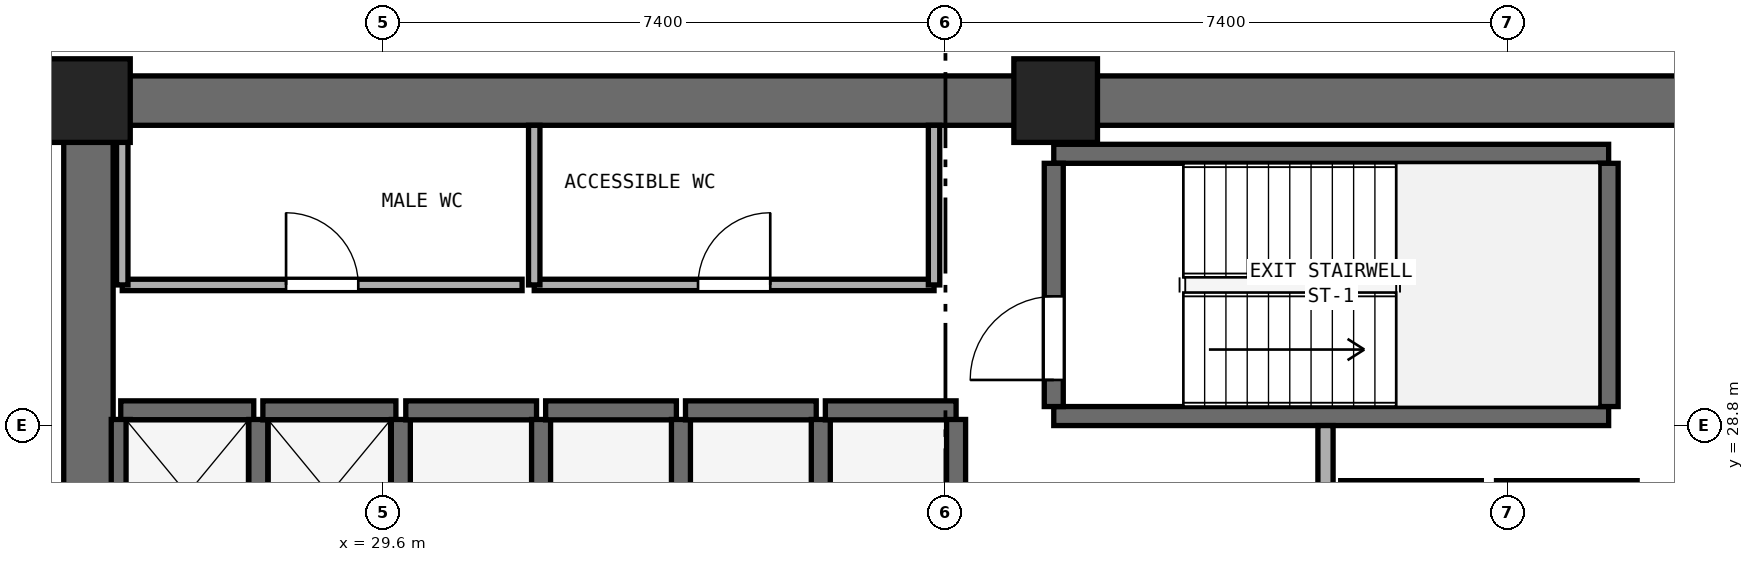
"""IFC4 building model, lengths in metres.
Left out: names, types, materials, properties, quantities, classifications, styles, units other than length and angle.
Written with IfcOpenShell. Run it as: python <this file> out.ifc"""

import sys

from ifc_helpers import new_model, si_unit, direction, frame, frame_2d, origin, origin_2d, place, context, subcontext, project, spatial, rectangle, extrude, element, fill, save


model = new_model("IFC4")
c1 = context("Model", 3, precision=1e-05, world=origin(), true_north=direction((0.0, 1.0)))
c2 = subcontext(c1, "Body", "Model", "MODEL_VIEW")
j1 = project(units=[si_unit("LENGTHUNIT", "METRE"), si_unit("PLANEANGLEUNIT", "RADIAN")], contexts=[c1])
p1 = place(None, origin())
s1 = spatial("IfcSite", under=j1, at=p1, CompositionType="ELEMENT")
p2 = place(p1, origin())
s2 = spatial("IfcBuilding", under=s1, at=p2, CompositionType="ELEMENT")
p3 = place(p2, frame((0.0, 0.0, 44.0)))
s3 = spatial("IfcBuildingStorey", under=s2, at=p3, CompositionType="ELEMENT", Elevation=44.0)
p4 = place(p3, frame((25.4, 33.075, 0.0), z_axis=(0.0, 0.0, 1.0), x_axis=(1.0, 0.0, 0.0)))
e1 = element("IfcWall", 1, at=p4, inside=s3, PredefinedType="SHEAR", context=c2, shape_type="SweptSolid", body=[
    extrude(rectangle(XDim=23.2, YDim=0.65, at=frame_2d((11.6, 0.0))), origin(), (0.0, 0.0, 1.0), 3.525),
])
p5 = place(p3, frame((25.725, 17.65, 0.0), z_axis=(0.0, 0.0, 1.0), x_axis=(0.0, 1.0, 0.0)))
e2 = element("IfcWall", 2, at=p5, inside=s3, PredefinedType="SHEAR", context=c2, shape_type="SweptSolid", body=[
    extrude(rectangle(XDim=15.1, YDim=0.65, at=frame_2d((7.55, 0.0))), origin(), (0.0, 0.0, 1.0), 3.525),
])
p6 = place(p5, frame((6.8, 0.0, 0.0)))
e3 = element("IfcOpeningElement", 3, at=p6, cuts=e2, PredefinedType="OPENING", context=c2, shape_type="SweptSolid", body=[
    extrude(rectangle(XDim=1.5, YDim=2.15, at=frame_2d((0.75, 1.075))), frame((0.0, 0.335, 0.0), z_axis=(0.0, -1.0, 0.0), x_axis=(1.0, 0.0, 0.0)), (0.0, 0.0, 1.0), 0.67),
])
for number, where, z_axis, x_axis in (
    (4, (38.45, 33.075, 0.0), (0.0, 0.0, 1.0), (1.0, 0.0, 0.0)),
    (5, (25.725, 33.075, 0.0), (0.0, 0.0, 1.0), (1.0, 0.0, 0.0)),
):
    element("IfcColumn", number, at=place(p3, frame(where, z_axis=z_axis, x_axis=x_axis)), inside=s3, PredefinedType="PILASTER", context=c2, shape_type="SweptSolid", body=[
        extrude(rectangle(XDim=1.1, YDim=1.1, at=origin_2d()), origin(), (0.0, 0.0, 1.0), 3.8),
    ])
for number, where, z_axis, x_axis in (
    (6, (38.425, 28.925, 0.0), (0.0, 0.0, 1.0), (1.0, 0.0, 0.0)),
    (7, (38.425, 32.375, 0.0), (0.0, 0.0, 1.0), (1.0, 0.0, 0.0)),
):
    element("IfcWall", number, at=place(p3, frame(where, z_axis=z_axis, x_axis=x_axis)), inside=s3, PredefinedType="SHEAR", context=c2, shape_type="SweptSolid", body=[
        extrude(rectangle(XDim=7.3, YDim=0.25, at=frame_2d((3.65, 0.0))), origin(), (0.0, 0.0, 1.0), 3.525),
    ])
p7 = place(p3, frame((38.425, 29.05, 0.0), z_axis=(0.0, 0.0, 1.0), x_axis=(0.0, 1.0, 0.0)))
e8 = element("IfcWall", 8, at=p7, inside=s3, PredefinedType="SHEAR", context=c2, shape_type="SweptSolid", body=[
    extrude(rectangle(XDim=3.2, YDim=0.25, at=frame_2d((1.6, 0.0))), origin(), (0.0, 0.0, 1.0), 3.525),
])
p8 = place(p7, frame((0.35, 0.0, 0.0)))
e9 = element("IfcOpeningElement", 9, at=p8, cuts=e8, PredefinedType="OPENING", context=c2, shape_type="SweptSolid", body=[
    extrude(rectangle(XDim=1.1, YDim=2.15, at=frame_2d((0.55, 1.075))), frame((0.0, 0.135, 0.0), z_axis=(0.0, -1.0, 0.0), x_axis=(1.0, 0.0, 0.0)), (0.0, 0.0, 1.0), 0.27),
])
p9 = place(p3, frame((45.725, 29.05, 0.0), z_axis=(0.0, 0.0, 1.0), x_axis=(0.0, 1.0, 0.0)))
e10 = element("IfcWall", 10, at=p9, inside=s3, PredefinedType="SHEAR", context=c2, shape_type="SweptSolid", body=[
    extrude(rectangle(XDim=3.2, YDim=0.25, at=frame_2d((1.6, 0.0))), origin(), (0.0, 0.0, 1.0), 3.525),
])
p10 = place(p3, frame((26.15, 29.0, 0.0), z_axis=(0.0, 0.0, 1.0), x_axis=(1.0, 0.0, 0.0)))
e11 = element("IfcWall", 11, at=p10, inside=s3, PredefinedType="SHEAR", context=c2, shape_type="SweptSolid", body=[
    extrude(rectangle(XDim=1.75, YDim=0.25, at=frame_2d((0.875, 0.0))), origin(), (0.0, 0.0, 1.0), 3.525),
])
for number, where, z_axis, x_axis in (
    (12, (26.15, 26.92, 0.0), (0.0, 0.0, 1.0), (0.0, 1.0, 0.0)),
    (13, (27.96, 26.92, 0.0), (0.0, 0.0, 1.0), (0.0, 1.0, 0.0)),
):
    element("IfcWall", number, at=place(p3, frame(where, z_axis=z_axis, x_axis=x_axis)), inside=s3, PredefinedType="SHEAR", context=c2, shape_type="SweptSolid", body=[
        extrude(rectangle(XDim=1.96, YDim=0.25, at=frame_2d((0.98, 0.0))), origin(), (0.0, 0.0, 1.0), 3.525),
    ])
p11 = place(p3, frame((28.02, 29.0, 0.0), z_axis=(0.0, 0.0, 1.0), x_axis=(1.0, 0.0, 0.0)))
e14 = element("IfcWall", 14, at=p11, inside=s3, PredefinedType="SHEAR", context=c2, shape_type="SweptSolid", body=[
    extrude(rectangle(XDim=1.75, YDim=0.25, at=frame_2d((0.875, 0.0))), origin(), (0.0, 0.0, 1.0), 3.525),
])
p12 = place(p3, frame((29.835, 26.92, 0.0), z_axis=(0.0, 0.0, 1.0), x_axis=(0.0, 1.0, 0.0)))
e15 = element("IfcWall", 15, at=p12, inside=s3, PredefinedType="SHEAR", context=c2, shape_type="SweptSolid", body=[
    extrude(rectangle(XDim=1.96, YDim=0.25, at=frame_2d((0.98, 0.0))), origin(), (0.0, 0.0, 1.0), 3.525),
])
p13 = place(p3, frame((29.9, 29.0, 0.0), z_axis=(0.0, 0.0, 1.0), x_axis=(1.0, 0.0, 0.0)))
e16 = element("IfcWall", 16, at=p13, inside=s3, PredefinedType="SHEAR", context=c2, shape_type="SweptSolid", body=[
    extrude(rectangle(XDim=1.72, YDim=0.25, at=frame_2d((0.86, 0.0))), origin(), (0.0, 0.0, 1.0), 3.525),
])
p14 = place(p3, frame((31.68, 26.92, 0.0), z_axis=(0.0, 0.0, 1.0), x_axis=(0.0, 1.0, 0.0)))
e17 = element("IfcWall", 17, at=p14, inside=s3, PredefinedType="SHEAR", context=c2, shape_type="SweptSolid", body=[
    extrude(rectangle(XDim=1.96, YDim=0.25, at=frame_2d((0.98, 0.0))), origin(), (0.0, 0.0, 1.0), 3.525),
])
p15 = place(p3, frame((31.74, 29.0, 0.0), z_axis=(0.0, 0.0, 1.0), x_axis=(1.0, 0.0, 0.0)))
e18 = element("IfcWall", 18, at=p15, inside=s3, PredefinedType="SHEAR", context=c2, shape_type="SweptSolid", body=[
    extrude(rectangle(XDim=1.72, YDim=0.25, at=frame_2d((0.86, 0.0))), origin(), (0.0, 0.0, 1.0), 3.525),
])
p16 = place(p3, frame((33.52, 26.92, 0.0), z_axis=(0.0, 0.0, 1.0), x_axis=(0.0, 1.0, 0.0)))
e19 = element("IfcWall", 19, at=p16, inside=s3, PredefinedType="SHEAR", context=c2, shape_type="SweptSolid", body=[
    extrude(rectangle(XDim=1.96, YDim=0.25, at=frame_2d((0.98, 0.0))), origin(), (0.0, 0.0, 1.0), 3.525),
])
p17 = place(p3, frame((33.58, 29.0, 0.0), z_axis=(0.0, 0.0, 1.0), x_axis=(1.0, 0.0, 0.0)))
e20 = element("IfcWall", 20, at=p17, inside=s3, PredefinedType="SHEAR", context=c2, shape_type="SweptSolid", body=[
    extrude(rectangle(XDim=1.72, YDim=0.25, at=frame_2d((0.86, 0.0))), origin(), (0.0, 0.0, 1.0), 3.525),
])
p18 = place(p3, frame((35.36, 26.92, 0.0), z_axis=(0.0, 0.0, 1.0), x_axis=(0.0, 1.0, 0.0)))
e21 = element("IfcWall", 21, at=p18, inside=s3, PredefinedType="SHEAR", context=c2, shape_type="SweptSolid", body=[
    extrude(rectangle(XDim=1.96, YDim=0.25, at=frame_2d((0.98, 0.0))), origin(), (0.0, 0.0, 1.0), 3.525),
])
p19 = place(p3, frame((35.42, 29.0, 0.0), z_axis=(0.0, 0.0, 1.0), x_axis=(1.0, 0.0, 0.0)))
e22 = element("IfcWall", 22, at=p19, inside=s3, PredefinedType="SHEAR", context=c2, shape_type="SweptSolid", body=[
    extrude(rectangle(XDim=1.72, YDim=0.25, at=frame_2d((0.86, 0.0))), origin(), (0.0, 0.0, 1.0), 3.525),
])
p20 = place(p3, frame((37.14, 26.92, 0.0), z_axis=(0.0, 0.0, 1.0), x_axis=(0.0, 1.0, 0.0)))
e23 = element("IfcWall", 23, at=p20, inside=s3, PredefinedType="SHEAR", context=c2, shape_type="SweptSolid", body=[
    extrude(rectangle(XDim=1.96, YDim=0.25, at=frame_2d((0.98, 0.0))), origin(), (0.0, 0.0, 1.0), 3.525),
])
for number, where, z_axis, x_axis in (
    (24, (42.2, 27.95, 0.0), (0.0, 0.0, 1.0), (1.0, 0.0, 0.0)),
    (25, (44.25, 27.95, 0.0), (0.0, 0.0, 1.0), (1.0, 0.0, 0.0)),
):
    element("IfcWall", number, at=place(p3, frame(where, z_axis=z_axis, x_axis=x_axis)), inside=s3, PredefinedType="SHEAR", context=c2, shape_type="SweptSolid", body=[
        extrude(rectangle(XDim=1.85, YDim=0.25, at=frame_2d((0.925, 0.0))), origin(), (0.0, 0.0, 1.0), 3.525),
    ])
p21 = place(p3, frame((42.0, 22.75, 0.0), z_axis=(0.0, 0.0, 1.0), x_axis=(0.0, 1.0, 0.0)))
e26 = element("IfcWall", 26, at=p21, inside=s3, PredefinedType="SOLIDWALL", context=c2, shape_type="SweptSolid", body=[
    extrude(rectangle(XDim=6.05, YDim=0.2, at=frame_2d((3.025, 0.0))), origin(), (0.0, 0.0, 1.0), 3.525),
])
p22 = place(p21, frame((0.65, 0.0, 0.0)))
e27 = element("IfcOpeningElement", 27, at=p22, cuts=e26, PredefinedType="OPENING", context=c2, shape_type="SweptSolid", body=[
    extrude(rectangle(XDim=1.2, YDim=2.15, at=frame_2d((0.6, 1.075))), frame((0.0, 0.11, 0.0), z_axis=(0.0, -1.0, 0.0), x_axis=(1.0, 0.0, 0.0)), (0.0, 0.0, 1.0), 0.22),
])
p23 = place(p3, frame((26.17, 30.65, 0.0), z_axis=(0.0, 0.0, 1.0), x_axis=(1.0, 0.0, 0.0)))
e28 = element("IfcWall", 28, at=p23, inside=s3, PredefinedType="PARTITIONING", context=c2, shape_type="SweptSolid", body=[
    extrude(rectangle(XDim=5.26, YDim=0.15, at=frame_2d((2.63, 0.0))), origin(), (0.0, 0.0, 1.0), 3.525),
])
p24 = place(p23, frame((2.155, 0.0, 0.0)))
e29 = element("IfcOpeningElement", 29, at=p24, cuts=e28, PredefinedType="OPENING", context=c2, shape_type="SweptSolid", body=[
    extrude(rectangle(XDim=0.95, YDim=2.1, at=frame_2d((0.475, 1.05))), frame((0.0, 0.085, 0.0), z_axis=(0.0, -1.0, 0.0), x_axis=(1.0, 0.0, 0.0)), (0.0, 0.0, 1.0), 0.17),
])
p25 = place(p3, frame((26.17, 30.65, 0.0), z_axis=(0.0, 0.0, 1.0), x_axis=(0.0, 1.0, 0.0)))
e30 = element("IfcWall", 30, at=p25, inside=s3, PredefinedType="PARTITIONING", context=c2, shape_type="SweptSolid", body=[
    extrude(rectangle(XDim=2.1, YDim=0.15, at=frame_2d((1.05, 0.0))), origin(), (0.0, 0.0, 1.0), 3.525),
])
p26 = place(p3, frame((31.59, 30.65, 0.0), z_axis=(0.0, 0.0, 1.0), x_axis=(1.0, 0.0, 0.0)))
e31 = element("IfcWall", 31, at=p26, inside=s3, PredefinedType="PARTITIONING", context=c2, shape_type="SweptSolid", body=[
    extrude(rectangle(XDim=5.26, YDim=0.15, at=frame_2d((2.63, 0.0))), origin(), (0.0, 0.0, 1.0), 3.525),
])
p27 = place(p26, frame((2.155, 0.0, 0.0)))
e32 = element("IfcOpeningElement", 32, at=p27, cuts=e31, PredefinedType="OPENING", context=c2, shape_type="SweptSolid", body=[
    extrude(rectangle(XDim=0.95, YDim=2.1, at=frame_2d((0.475, 1.05))), frame((0.0, 0.085, 0.0), z_axis=(0.0, -1.0, 0.0), x_axis=(1.0, 0.0, 0.0)), (0.0, 0.0, 1.0), 0.17),
])
for number, where, z_axis, x_axis in (
    (33, (31.59, 30.65, 0.0), (0.0, 0.0, 1.0), (0.0, 1.0, 0.0)),
    (34, (36.85, 30.65, 0.0), (0.0, 0.0, 1.0), (0.0, 1.0, 0.0)),
):
    element("IfcWall", number, at=place(p3, frame(where, z_axis=z_axis, x_axis=x_axis)), inside=s3, PredefinedType="PARTITIONING", context=c2, shape_type="SweptSolid", body=[
        extrude(rectangle(XDim=2.1, YDim=0.15, at=frame_2d((1.05, 0.0))), origin(), (0.0, 0.0, 1.0), 3.525),
    ])
p28 = place(p8, origin())
e35 = element("IfcDoor", 35, at=p28, inside=s3, OperationType="SINGLE_SWING_LEFT", PredefinedType="DOOR", context=c2, shape_type="SweptSolid", body=[
    extrude(rectangle(XDim=1.1, YDim=2.15, at=frame_2d((0.55, 1.075))), frame((0.0, 0.025, 0.0), z_axis=(0.0, -1.0, 0.0), x_axis=(1.0, 0.0, 0.0)), (0.0, 0.0, 1.0), 0.05),
])
fill(e9, e35)
p29 = place(p24, origin())
e36 = element("IfcDoor", 36, at=p29, inside=s3, OperationType="SINGLE_SWING_LEFT", PredefinedType="DOOR", context=c2, shape_type="SweptSolid", body=[
    extrude(rectangle(XDim=0.95, YDim=2.1, at=frame_2d((0.475, 1.05))), frame((0.0, 0.025, 0.0), z_axis=(0.0, -1.0, 0.0), x_axis=(1.0, 0.0, 0.0)), (0.0, 0.0, 1.0), 0.05),
])
fill(e29, e36)
p30 = place(p27, origin())
e37 = element("IfcDoor", 37, at=p30, inside=s3, OperationType="SINGLE_SWING_RIGHT", PredefinedType="DOOR", context=c2, shape_type="SweptSolid", body=[
    extrude(rectangle(XDim=0.95, YDim=2.1, at=frame_2d((0.475, 1.05))), frame((0.0, 0.025, 0.0), z_axis=(0.0, -1.0, 0.0), x_axis=(1.0, 0.0, 0.0)), (0.0, 0.0, 1.0), 0.05),
])
fill(e32, e37)
save(model, sys.argv[1])
